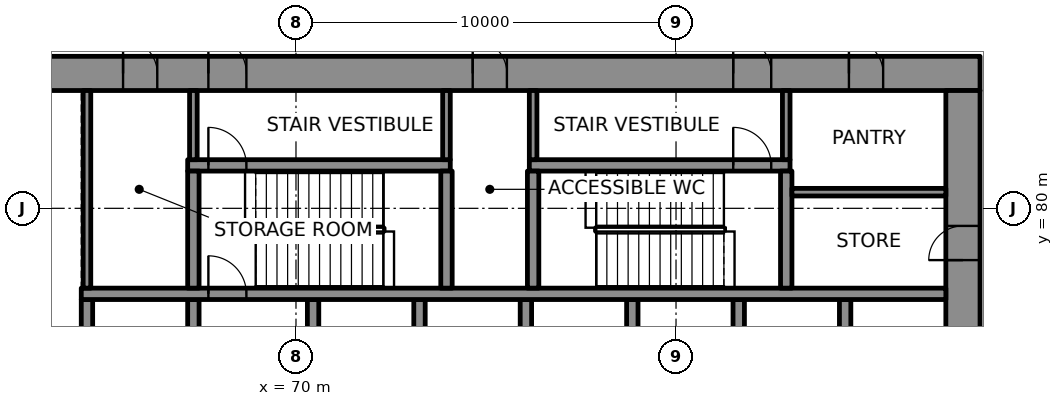
"""IFC4 building model, lengths in metres.
Left out: names, types, materials, properties, quantities, classifications, styles, units other than length and angle.
Written with IfcOpenShell. Run it as: python <this file> out.ifc"""

import sys

from ifc_helpers import new_model, si_unit, direction, frame, frame_2d, origin, place, context, subcontext, project, spatial, rectangle, extrude, element, fill, save


model = new_model("IFC4")
c1 = context("Model", 3, precision=1e-05, world=origin(), true_north=direction((0.0, 1.0)))
c2 = subcontext(c1, "Body", "Model", "MODEL_VIEW")
j1 = project(units=[si_unit("LENGTHUNIT", "METRE"), si_unit("PLANEANGLEUNIT", "RADIAN")], contexts=[c1])
p1 = place(None, origin())
s1 = spatial("IfcSite", under=j1, at=p1, CompositionType="ELEMENT")
p2 = place(p1, origin())
s2 = spatial("IfcBuilding", under=s1, at=p2, CompositionType="ELEMENT")
p3 = place(p2, frame((0.0, 0.0, 12.6)))
s3 = spatial("IfcBuildingStorey", under=s2, at=p3, CompositionType="ELEMENT", Elevation=12.6)
p4 = place(p3, frame((62.0, 83.55, 0.0), z_axis=(0.0, 0.0, 1.0), x_axis=(1.0, 0.0, 0.0)))
e1 = element("IfcWall", 1, at=p4, inside=s3, PredefinedType="SHEAR", context=c2, shape_type="SweptSolid", body=[
    extrude(rectangle(XDim=26.0, YDim=0.9, at=frame_2d((13.0, 0.0))), origin(), (0.0, 0.0, 1.0), 4.3),
])
p5 = place(p4, frame((5.695, 0.0, 0.0)))
e2 = element("IfcOpeningElement", 2, at=p5, cuts=e1, PredefinedType="OPENING", context=c2, shape_type="SweptSolid", body=[
    extrude(rectangle(XDim=1.0, YDim=2.1, at=frame_2d((0.5, 1.05))), frame((0.0, 0.46, 0.0), z_axis=(0.0, -1.0, 0.0), x_axis=(1.0, 0.0, 0.0)), (0.0, 0.0, 1.0), 0.92),
])
p6 = place(p4, frame((19.505, 0.0, 0.0)))
e3 = element("IfcOpeningElement", 3, at=p6, cuts=e1, PredefinedType="OPENING", context=c2, shape_type="SweptSolid", body=[
    extrude(rectangle(XDim=1.0, YDim=2.1, at=frame_2d((0.5, 1.05))), frame((0.0, 0.46, 0.0), z_axis=(0.0, -1.0, 0.0), x_axis=(1.0, 0.0, 0.0)), (0.0, 0.0, 1.0), 0.92),
])
p7 = place(p4, frame((3.45, 0.0, 0.0)))
e4 = element("IfcOpeningElement", 4, at=p7, cuts=e1, PredefinedType="OPENING", context=c2, shape_type="SweptSolid", body=[
    extrude(rectangle(XDim=0.9, YDim=2.1, at=frame_2d((0.45, 1.05))), frame((0.0, 0.46, 0.0), z_axis=(0.0, -1.0, 0.0), x_axis=(1.0, 0.0, 0.0)), (0.0, 0.0, 1.0), 0.92),
])
p8 = place(p4, frame((12.65, 0.0, 0.0)))
e5 = element("IfcOpeningElement", 5, at=p8, cuts=e1, PredefinedType="OPENING", context=c2, shape_type="SweptSolid", body=[
    extrude(rectangle(XDim=0.9, YDim=2.1, at=frame_2d((0.45, 1.05))), frame((0.0, 0.46, 0.0), z_axis=(0.0, -1.0, 0.0), x_axis=(1.0, 0.0, 0.0)), (0.0, 0.0, 1.0), 0.92),
])
p9 = place(p4, frame((22.55, 0.0, 0.0)))
e6 = element("IfcOpeningElement", 6, at=p9, cuts=e1, PredefinedType="OPENING", context=c2, shape_type="SweptSolid", body=[
    extrude(rectangle(XDim=0.9, YDim=2.1, at=frame_2d((0.45, 1.05))), frame((0.0, 0.46, 0.0), z_axis=(0.0, -1.0, 0.0), x_axis=(1.0, 0.0, 0.0)), (0.0, 0.0, 1.0), 0.92),
])
p10 = place(p3, frame((87.55, 66.9, 0.0), z_axis=(0.0, 0.0, 1.0), x_axis=(0.0, 1.0, 0.0)))
e7 = element("IfcWall", 7, at=p10, inside=s3, PredefinedType="SHEAR", context=c2, shape_type="SweptSolid", body=[
    extrude(rectangle(XDim=16.2, YDim=0.9, at=frame_2d((8.1, 0.0))), origin(), (0.0, 0.0, 1.0), 4.3),
])
p11 = place(p10, frame((5.5, 0.0, 0.0)))
e8 = element("IfcOpeningElement", 8, at=p11, cuts=e7, PredefinedType="OPENING", context=c2, shape_type="SweptSolid", body=[
    extrude(rectangle(XDim=1.8, YDim=2.1, at=frame_2d((0.9, 1.05))), frame((0.0, 0.46, 0.0), z_axis=(0.0, -1.0, 0.0), x_axis=(1.0, 0.0, 0.0)), (0.0, 0.0, 1.0), 0.92),
])
p12 = place(p10, frame((11.738, 0.0, 0.0)))
e9 = element("IfcOpeningElement", 9, at=p12, cuts=e7, PredefinedType="OPENING", context=c2, shape_type="SweptSolid", body=[
    extrude(rectangle(XDim=0.9, YDim=2.1, at=frame_2d((0.45, 1.05))), frame((0.0, 0.46, 0.0), z_axis=(0.0, -1.0, 0.0), x_axis=(1.0, 0.0, 0.0)), (0.0, 0.0, 1.0), 0.92),
])
for number, where, z_axis, x_axis in (
    (10, (64.5, 75.0, 0.0), (0.0, 0.0, 1.0), (0.0, 1.0, 0.0)),
    (11, (67.3, 75.0, 0.0), (0.0, 0.0, 1.0), (0.0, 1.0, 0.0)),
):
    element("IfcWall", number, at=place(p3, frame(where, z_axis=z_axis, x_axis=x_axis)), inside=s3, PredefinedType="SHEAR", context=c2, shape_type="SweptSolid", body=[
        extrude(rectangle(XDim=2.6, YDim=0.3, at=frame_2d((1.3, 0.0))), origin(), (0.0, 0.0, 1.0), 4.3),
    ])
p13 = place(p3, frame((70.45, 75.0, 0.0), z_axis=(0.0, 0.0, 1.0), x_axis=(0.0, 1.0, 0.0)))
e12 = element("IfcWall", 12, at=p13, inside=s3, PredefinedType="SHEAR", context=c2, shape_type="SweptSolid", body=[
    extrude(rectangle(XDim=2.6, YDim=0.3, at=frame_2d((1.3, 0.0))), origin(), (0.0, 0.0, 1.0), 4.3),
])
p14 = place(p13, frame((0.15, 0.0, 0.0)))
e13 = element("IfcOpeningElement", 13, at=p14, cuts=e12, PredefinedType="OPENING", context=c2, shape_type="SweptSolid", body=[
    extrude(rectangle(XDim=1.1, YDim=2.1, at=frame_2d((0.55, 1.05))), frame((0.0, 0.16, 0.0), z_axis=(0.0, -1.0, 0.0), x_axis=(1.0, 0.0, 0.0)), (0.0, 0.0, 1.0), 0.32),
])
for number, where, z_axis, x_axis in (
    (14, (73.25, 75.0, 0.0), (0.0, 0.0, 1.0), (0.0, 1.0, 0.0)),
    (15, (76.05, 75.0, 0.0), (0.0, 0.0, 1.0), (0.0, 1.0, 0.0)),
    (16, (78.85, 75.0, 0.0), (0.0, 0.0, 1.0), (0.0, 1.0, 0.0)),
    (17, (81.65, 75.0, 0.0), (0.0, 0.0, 1.0), (0.0, 1.0, 0.0)),
    (18, (84.45, 75.0, 0.0), (0.0, 0.0, 1.0), (0.0, 1.0, 0.0)),
):
    element("IfcWall", number, at=place(p3, frame(where, z_axis=z_axis, x_axis=x_axis)), inside=s3, PredefinedType="SHEAR", context=c2, shape_type="SweptSolid", body=[
        extrude(rectangle(XDim=2.6, YDim=0.3, at=frame_2d((1.3, 0.0))), origin(), (0.0, 0.0, 1.0), 4.3),
    ])
p15 = place(p3, frame((64.35, 77.75, 0.0), z_axis=(0.0, 0.0, 1.0), x_axis=(1.0, 0.0, 0.0)))
e19 = element("IfcWall", 19, at=p15, inside=s3, PredefinedType="SHEAR", context=c2, shape_type="SweptSolid", body=[
    extrude(rectangle(XDim=22.75, YDim=0.3, at=frame_2d((11.375, 0.0))), origin(), (0.0, 0.0, 1.0), 4.3),
])
p16 = place(p15, frame((3.345, 0.0, 0.0)))
e20 = element("IfcOpeningElement", 20, at=p16, cuts=e19, PredefinedType="OPENING", context=c2, shape_type="SweptSolid", body=[
    extrude(rectangle(XDim=1.0, YDim=2.1, at=frame_2d((0.5, 1.05))), frame((0.0, 0.16, 0.0), z_axis=(0.0, -1.0, 0.0), x_axis=(1.0, 0.0, 0.0)), (0.0, 0.0, 1.0), 0.32),
])
p17 = place(p3, frame((67.15, 81.13, 0.0), z_axis=(0.0, 0.0, 1.0), x_axis=(1.0, 0.0, 0.0)))
e21 = element("IfcWall", 21, at=p17, inside=s3, PredefinedType="SHEAR", context=c2, shape_type="SweptSolid", body=[
    extrude(rectangle(XDim=6.91, YDim=0.3, at=frame_2d((3.455, 0.0))), origin(), (0.0, 0.0, 1.0), 4.3),
])
p18 = place(p17, frame((0.545, 0.0, 0.0)))
e22 = element("IfcOpeningElement", 22, at=p18, cuts=e21, PredefinedType="OPENING", context=c2, shape_type="SweptSolid", body=[
    extrude(rectangle(XDim=1.0, YDim=2.1, at=frame_2d((0.5, 1.05))), frame((0.0, 0.16, 0.0), z_axis=(0.0, -1.0, 0.0), x_axis=(1.0, 0.0, 0.0)), (0.0, 0.0, 1.0), 0.32),
])
p19 = place(p3, frame((76.14, 81.13, 0.0), z_axis=(0.0, 0.0, 1.0), x_axis=(1.0, 0.0, 0.0)))
e23 = element("IfcWall", 23, at=p19, inside=s3, PredefinedType="SHEAR", context=c2, shape_type="SweptSolid", body=[
    extrude(rectangle(XDim=6.86, YDim=0.3, at=frame_2d((3.43, 0.0))), origin(), (0.0, 0.0, 1.0), 4.3),
])
p20 = place(p19, frame((5.365, 0.0, 0.0)))
e24 = element("IfcOpeningElement", 24, at=p20, cuts=e23, PredefinedType="OPENING", context=c2, shape_type="SweptSolid", body=[
    extrude(rectangle(XDim=1.0, YDim=2.1, at=frame_2d((0.5, 1.05))), frame((0.0, 0.16, 0.0), z_axis=(0.0, -1.0, 0.0), x_axis=(1.0, 0.0, 0.0)), (0.0, 0.0, 1.0), 0.32),
])
for number, where, z_axis, x_axis in (
    (25, (67.3, 77.9, 0.0), (0.0, 0.0, 1.0), (0.0, 1.0, 0.0)),
    (26, (73.96, 77.9, 0.0), (0.0, 0.0, 1.0), (0.0, 1.0, 0.0)),
    (27, (76.24, 77.9, 0.0), (0.0, 0.0, 1.0), (0.0, 1.0, 0.0)),
    (28, (82.9, 77.9, 0.0), (0.0, 0.0, 1.0), (0.0, 1.0, 0.0)),
):
    element("IfcWall", number, at=place(p3, frame(where, z_axis=z_axis, x_axis=x_axis)), inside=s3, PredefinedType="SHEAR", context=c2, shape_type="SweptSolid", body=[
        extrude(rectangle(XDim=3.08, YDim=0.3, at=frame_2d((1.54, 0.0))), origin(), (0.0, 0.0, 1.0), 4.3),
    ])
p21 = place(p3, frame((83.05, 80.425, 0.0), z_axis=(0.0, 0.0, 1.0), x_axis=(1.0, 0.0, 0.0)))
e29 = element("IfcWall", 29, at=p21, inside=s3, PredefinedType="PARTITIONING", context=c2, shape_type="SweptSolid", body=[
    extrude(rectangle(XDim=4.05, YDim=0.2, at=frame_2d((2.025, 0.0))), origin(), (0.0, 0.0, 1.0), 4.3),
])
p22 = place(p3, frame((64.5, 77.9, 0.0), z_axis=(0.0, 0.0, 1.0), x_axis=(0.0, 1.0, 0.0)))
e30 = element("IfcWall", 30, at=p22, inside=s3, PredefinedType="PARTITIONING", context=c2, shape_type="SweptSolid", body=[
    extrude(rectangle(XDim=5.2, YDim=0.2, at=frame_2d((2.6, 0.0))), origin(), (0.0, 0.0, 1.0), 4.3),
])
for number, where, z_axis, x_axis in (
    (31, (67.3, 81.28, 0.0), (0.0, 0.0, 1.0), (0.0, 1.0, 0.0)),
    (32, (73.96, 81.28, 0.0), (0.0, 0.0, 1.0), (0.0, 1.0, 0.0)),
    (33, (76.24, 81.28, 0.0), (0.0, 0.0, 1.0), (0.0, 1.0, 0.0)),
    (34, (82.9, 81.28, 0.0), (0.0, 0.0, 1.0), (0.0, 1.0, 0.0)),
):
    element("IfcWall", number, at=place(p3, frame(where, z_axis=z_axis, x_axis=x_axis)), inside=s3, PredefinedType="PARTITIONING", context=c2, shape_type="SweptSolid", body=[
        extrude(rectangle(XDim=1.82, YDim=0.2, at=frame_2d((0.91, 0.0))), origin(), (0.0, 0.0, 1.0), 4.3),
    ])
p23 = place(p3, frame((107.106, 62.36, 0.0), z_axis=(0.0, 0.0, 1.0), x_axis=(-0.49999992739, 0.866025445706, 0.0)))
e35 = element("IfcWall", 35, at=p23, inside=s3, PredefinedType="SOLIDWALL", context=c2, shape_type="SweptSolid", body=[
    extrude(rectangle(XDim=54.0, YDim=0.4, at=frame_2d((27.0, 0.0))), origin(), (0.0, 0.0, 1.0), 4.24),
])
p24 = place(p3, frame((112.496, 65.725, 0.0), z_axis=(0.0, 0.0, 1.0), x_axis=(-0.499998673217, 0.866026169802, 0.0)))
e36 = element("IfcWall", 36, at=p24, inside=s3, PredefinedType="PARTITIONING", context=c2, shape_type="SweptSolid", body=[
    extrude(rectangle(XDim=53.48, YDim=0.2, at=frame_2d((26.74, 0.0))), origin(), (0.0, 0.0, 1.0), 4.24),
])
p25 = place(p24, frame((13.08, 0.0, 0.0)))
e37 = element("IfcOpeningElement", 37, at=p25, cuts=e36, PredefinedType="OPENING", context=c2, shape_type="SweptSolid", body=[
    extrude(rectangle(XDim=1.0, YDim=2.1, at=frame_2d((0.5, 1.05))), frame((0.0, 0.11, 0.0), z_axis=(0.0, -1.0, 0.0), x_axis=(1.0, 0.0, 0.0)), (0.0, 0.0, 1.0), 0.22),
])
p26 = place(p24, frame((26.28, 0.0, 0.0)))
e38 = element("IfcOpeningElement", 38, at=p26, cuts=e36, PredefinedType="OPENING", context=c2, shape_type="SweptSolid", body=[
    extrude(rectangle(XDim=1.0, YDim=2.1, at=frame_2d((0.5, 1.05))), frame((0.0, 0.11, 0.0), z_axis=(0.0, -1.0, 0.0), x_axis=(1.0, 0.0, 0.0)), (0.0, 0.0, 1.0), 0.22),
])
p27 = place(p24, frame((43.88, 0.0, 0.0)))
e39 = element("IfcOpeningElement", 39, at=p27, cuts=e36, PredefinedType="OPENING", context=c2, shape_type="SweptSolid", body=[
    extrude(rectangle(XDim=1.0, YDim=2.1, at=frame_2d((0.5, 1.05))), frame((0.0, 0.11, 0.0), z_axis=(0.0, -1.0, 0.0), x_axis=(1.0, 0.0, 0.0)), (0.0, 0.0, 1.0), 0.22),
])
p28 = place(p24, frame((50.58, 0.0, 0.0)))
e40 = element("IfcOpeningElement", 40, at=p28, cuts=e36, PredefinedType="OPENING", context=c2, shape_type="SweptSolid", body=[
    extrude(rectangle(XDim=1.0, YDim=2.1, at=frame_2d((0.5, 1.05))), frame((0.0, 0.11, 0.0), z_axis=(0.0, -1.0, 0.0), x_axis=(1.0, 0.0, 0.0)), (0.0, 0.0, 1.0), 0.22),
])
p29 = place(p16, origin())
e41 = element("IfcDoor", 41, at=p29, inside=s3, OperationType="SINGLE_SWING_LEFT", PredefinedType="DOOR", context=c2, shape_type="SweptSolid", body=[
    extrude(rectangle(XDim=1.0, YDim=2.1, at=frame_2d((0.5, 1.05))), frame((0.0, 0.025, 0.0), z_axis=(0.0, -1.0, 0.0), x_axis=(1.0, 0.0, 0.0)), (0.0, 0.0, 1.0), 0.05),
])
fill(e20, e41)
p30 = place(p18, origin())
e42 = element("IfcDoor", 42, at=p30, inside=s3, OperationType="SINGLE_SWING_RIGHT", PredefinedType="DOOR", context=c2, shape_type="SweptSolid", body=[
    extrude(rectangle(XDim=1.0, YDim=2.1, at=frame_2d((0.5, 1.05))), frame((0.0, 0.025, 0.0), z_axis=(0.0, -1.0, 0.0), x_axis=(1.0, 0.0, 0.0)), (0.0, 0.0, 1.0), 0.05),
])
fill(e22, e42)
p31 = place(p5, origin())
e43 = element("IfcDoor", 43, at=p31, inside=s3, OperationType="SINGLE_SWING_LEFT", PredefinedType="DOOR", context=c2, shape_type="SweptSolid", body=[
    extrude(rectangle(XDim=1.0, YDim=2.1, at=frame_2d((0.5, 1.05))), frame((0.0, 0.17, 0.0), z_axis=(0.0, -1.0, 0.0), x_axis=(1.0, 0.0, 0.0)), (0.0, 0.0, 1.0), 0.34),
])
fill(e2, e43)
p32 = place(p20, origin())
e44 = element("IfcDoor", 44, at=p32, inside=s3, OperationType="SINGLE_SWING_RIGHT", PredefinedType="DOOR", context=c2, shape_type="SweptSolid", body=[
    extrude(rectangle(XDim=1.0, YDim=2.1, at=frame_2d((0.5, 1.05))), frame((0.0, 0.025, 0.0), z_axis=(0.0, -1.0, 0.0), x_axis=(1.0, 0.0, 0.0)), (0.0, 0.0, 1.0), 0.05),
])
fill(e24, e44)
p33 = place(p6, origin())
e45 = element("IfcDoor", 45, at=p33, inside=s3, OperationType="SINGLE_SWING_LEFT", PredefinedType="DOOR", context=c2, shape_type="SweptSolid", body=[
    extrude(rectangle(XDim=1.0, YDim=2.1, at=frame_2d((0.5, 1.05))), frame((0.0, 0.17, 0.0), z_axis=(0.0, -1.0, 0.0), x_axis=(1.0, 0.0, 0.0)), (0.0, 0.0, 1.0), 0.34),
])
fill(e3, e45)
p34 = place(p7, origin())
e46 = element("IfcDoor", 46, at=p34, inside=s3, OperationType="SINGLE_SWING_RIGHT", PredefinedType="DOOR", context=c2, shape_type="SweptSolid", body=[
    extrude(rectangle(XDim=0.9, YDim=2.1, at=frame_2d((0.45, 1.05))), frame((0.0, 0.17, 0.0), z_axis=(0.0, -1.0, 0.0), x_axis=(1.0, 0.0, 0.0)), (0.0, 0.0, 1.0), 0.34),
])
fill(e4, e46)
p35 = place(p8, origin())
e47 = element("IfcDoor", 47, at=p35, inside=s3, OperationType="SINGLE_SWING_LEFT", PredefinedType="DOOR", context=c2, shape_type="SweptSolid", body=[
    extrude(rectangle(XDim=0.9, YDim=2.1, at=frame_2d((0.45, 1.05))), frame((0.0, 0.17, 0.0), z_axis=(0.0, -1.0, 0.0), x_axis=(1.0, 0.0, 0.0)), (0.0, 0.0, 1.0), 0.34),
])
fill(e5, e47)
p36 = place(p12, origin())
e48 = element("IfcDoor", 48, at=p36, inside=s3, OperationType="SINGLE_SWING_RIGHT", PredefinedType="DOOR", context=c2, shape_type="SweptSolid", body=[
    extrude(rectangle(XDim=0.9, YDim=2.1, at=frame_2d((0.45, 1.05))), frame((0.0, 0.17, 0.0), z_axis=(0.0, -1.0, 0.0), x_axis=(1.0, 0.0, 0.0)), (0.0, 0.0, 1.0), 0.34),
])
fill(e9, e48)
p37 = place(p9, origin())
e49 = element("IfcDoor", 49, at=p37, inside=s3, OperationType="SINGLE_SWING_LEFT", PredefinedType="DOOR", context=c2, shape_type="SweptSolid", body=[
    extrude(rectangle(XDim=0.9, YDim=2.1, at=frame_2d((0.45, 1.05))), frame((0.0, 0.17, 0.0), z_axis=(0.0, -1.0, 0.0), x_axis=(1.0, 0.0, 0.0)), (0.0, 0.0, 1.0), 0.34),
])
fill(e6, e49)
save(model, sys.argv[1])
